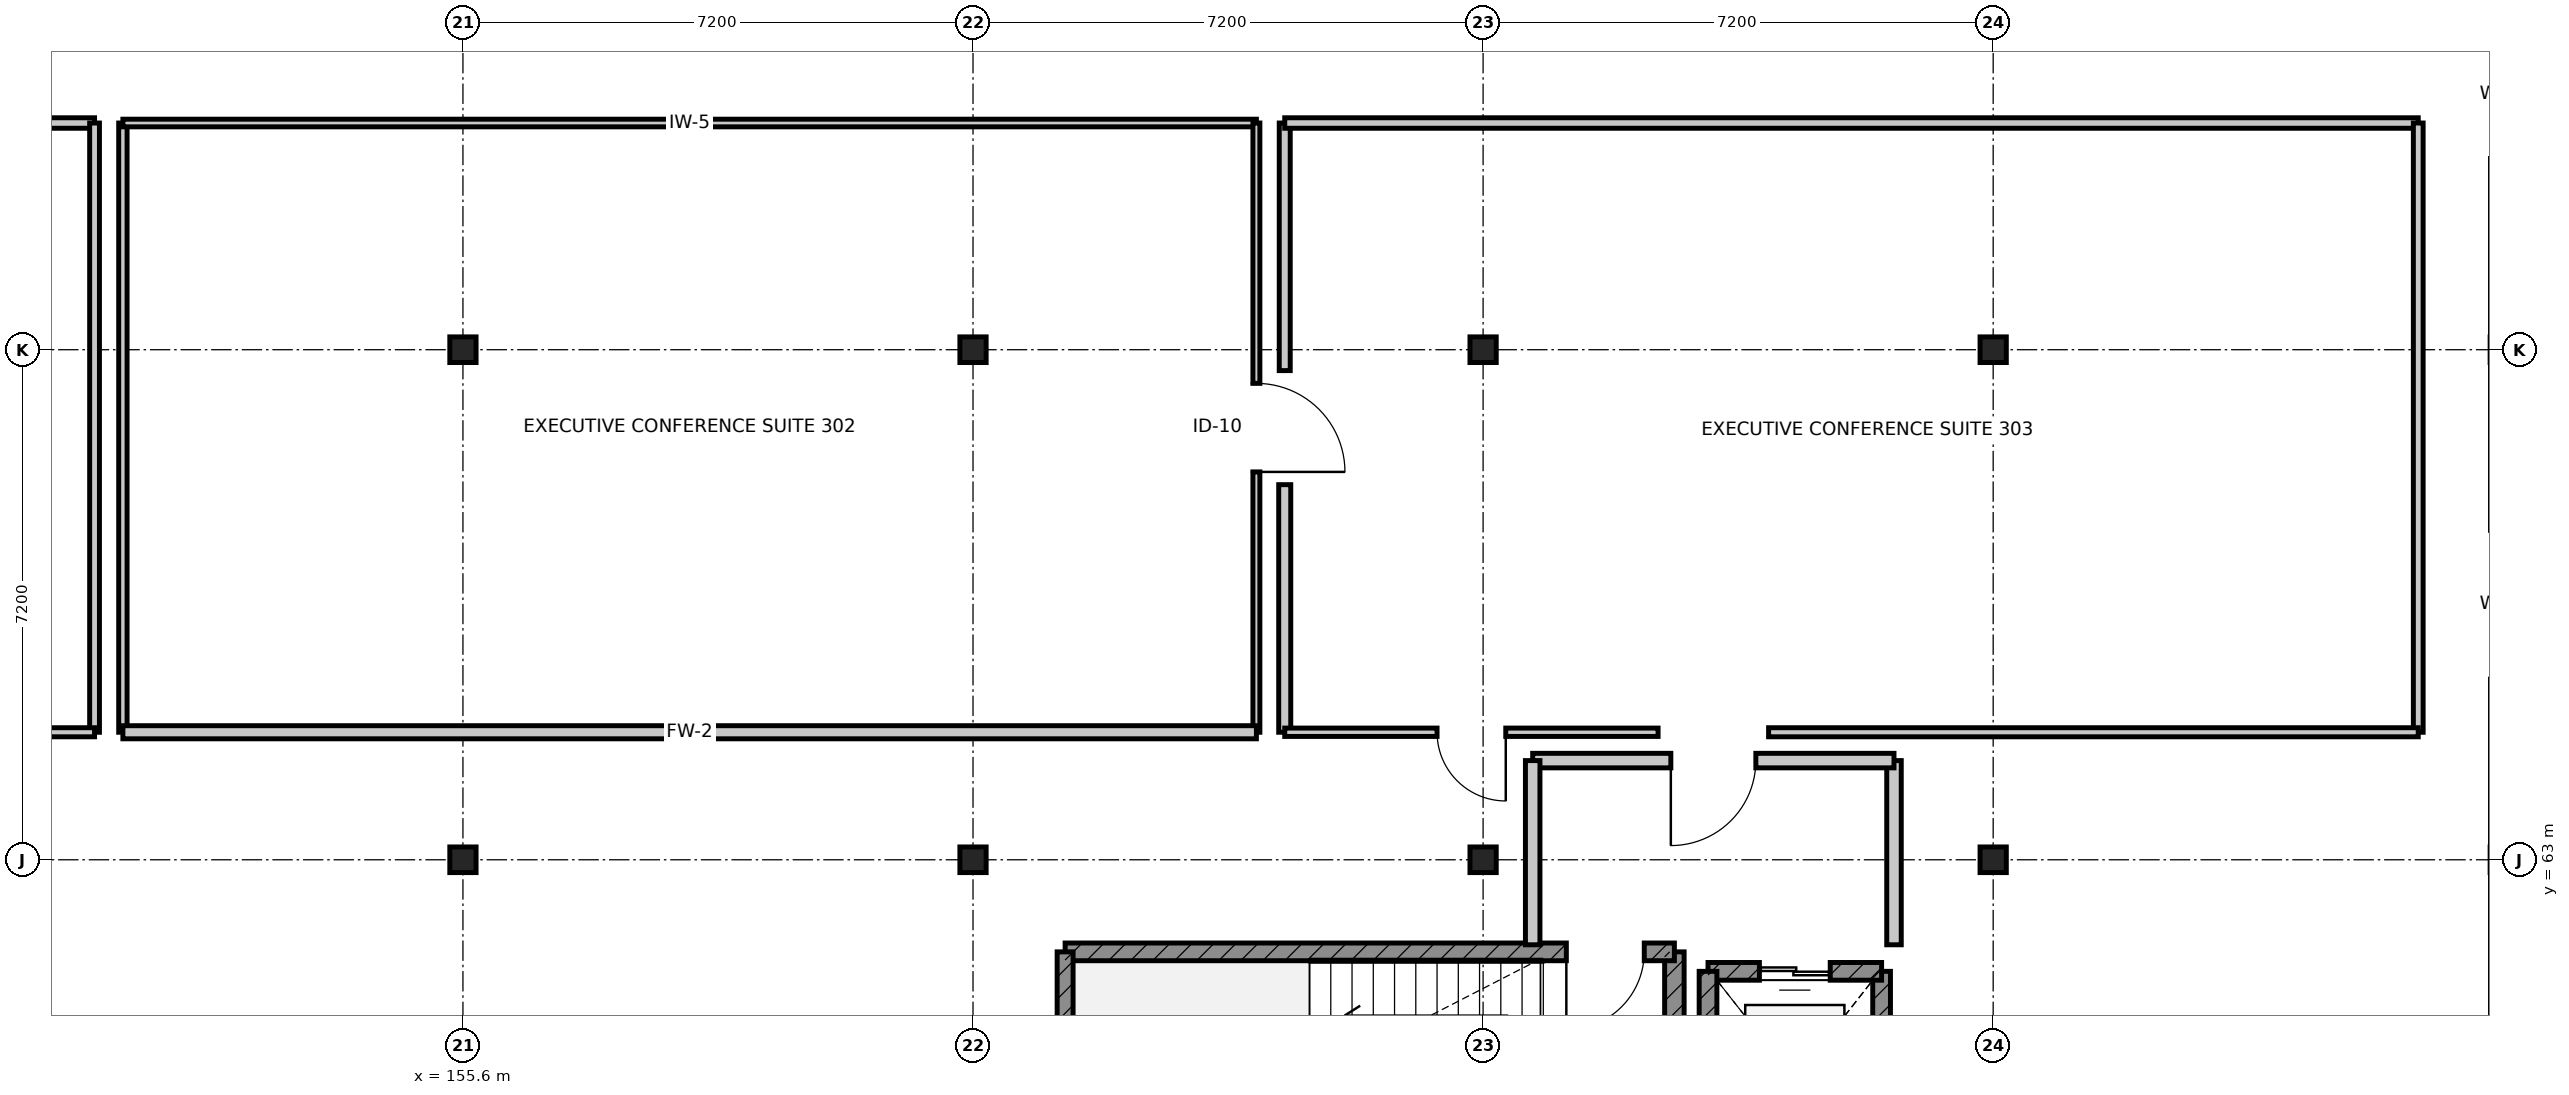
"""IFC4 building model, lengths in metres.
Left out: names, types, materials, properties, quantities, classifications, styles, units other than length and angle.
Written with IfcOpenShell. Run it as: python <this file> out.ifc"""

import sys

from ifc_helpers import new_model, si_unit, direction, frame, frame_2d, origin, origin_2d, place, context, subcontext, project, spatial, rectangle, i_section, extrude, element, fill, save


model = new_model("IFC4")
c1 = context("Model", 3, precision=1e-05, world=origin(), true_north=direction((0.0, 1.0)))
c2 = subcontext(c1, "Body", "Model", "MODEL_VIEW")
j1 = project(units=[si_unit("LENGTHUNIT", "METRE"), si_unit("PLANEANGLEUNIT", "RADIAN")], contexts=[c1])
p1 = place(None, origin())
s1 = spatial("IfcSite", under=j1, at=p1, CompositionType="ELEMENT")
p2 = place(p1, origin())
s2 = spatial("IfcBuilding", under=s1, at=p2, CompositionType="ELEMENT")
p3 = place(p2, frame((0.0, 0.0, 15.0)))
s3 = spatial("IfcBuildingStorey", under=s2, at=p3, CompositionType="ELEMENT", Elevation=15.0)
for number, where, z_axis, x_axis in (
    (1, (155.6, 63.0, 0.0), (0.0, 0.0, 1.0), (1.0, 0.0, 0.0)),
    (2, (155.6, 70.2, 0.0), (0.0, 0.0, 1.0), (1.0, 0.0, 0.0)),
    (3, (162.8, 63.0, 0.0), (0.0, 0.0, 1.0), (1.0, 0.0, 0.0)),
    (4, (162.8, 70.2, 0.0), (0.0, 0.0, 1.0), (1.0, 0.0, 0.0)),
    (5, (170.0, 63.0, 0.0), (0.0, 0.0, 1.0), (1.0, 0.0, 0.0)),
    (6, (170.0, 70.2, 0.0), (0.0, 0.0, 1.0), (1.0, 0.0, 0.0)),
    (7, (177.2, 63.0, 0.0), (0.0, 0.0, 1.0), (1.0, 0.0, 0.0)),
    (8, (177.2, 70.2, 0.0), (0.0, 0.0, 1.0), (1.0, 0.0, 0.0)),
):
    element("IfcColumn", number, at=place(p3, frame(where, z_axis=z_axis, x_axis=x_axis)), inside=s3, PredefinedType="COLUMN", context=c2, shape_type="SweptSolid", body=[
        extrude(i_section(OverallWidth=0.371, OverallDepth=0.362, WebThickness=0.012, FlangeThickness=0.021, FilletRadius=0.015, at=origin_2d()), origin(), (0.0, 0.0, 1.0), 4.2),
    ])
p4 = place(p3, frame((172.7, 58.1, 0.0), z_axis=(0.0, 0.0, 1.0), x_axis=(0.0, 1.0, 0.0)))
e9 = element("IfcWall", 9, at=p4, inside=s3, PredefinedType="SHEAR", context=c2, shape_type="SweptSolid", body=[
    extrude(rectangle(XDim=3.6, YDim=0.275, at=frame_2d((1.8, 0.0))), origin(), (0.0, 0.0, 1.0), 3.94),
])
p5 = place(p3, frame((172.7, 61.7, 0.0), z_axis=(0.0, 0.0, 1.0), x_axis=(-1.0, 0.0, 0.0)))
e10 = element("IfcWall", 10, at=p5, inside=s3, PredefinedType="SHEAR", context=c2, shape_type="SweptSolid", body=[
    extrude(rectangle(XDim=8.6, YDim=0.25, at=frame_2d((4.3, 0.0))), origin(), (0.0, 0.0, 1.0), 3.94),
])
p6 = place(p5, frame((0.425, 0.0, 0.0)))
e11 = element("IfcOpeningElement", 11, at=p6, cuts=e10, PredefinedType="OPENING", context=c2, shape_type="SweptSolid", body=[
    extrude(rectangle(XDim=1.1, YDim=2.1, at=frame_2d((0.55, 1.05))), frame((0.0, 0.135, 0.0), z_axis=(0.0, -1.0, 0.0), x_axis=(1.0, 0.0, 0.0)), (0.0, 0.0, 1.0), 0.27),
])
p7 = place(p3, frame((164.1, 61.7, 0.0), z_axis=(0.0, 0.0, 1.0), x_axis=(0.0, -1.0, 0.0)))
e12 = element("IfcWall", 12, at=p7, inside=s3, PredefinedType="SHEAR", context=c2, shape_type="SweptSolid", body=[
    extrude(rectangle(XDim=3.6, YDim=0.225, at=frame_2d((1.8, 0.0))), origin(), (0.0, 0.0, 1.0), 3.94),
])
p8 = place(p3, frame((175.625, 58.375, 0.0), z_axis=(0.0, 0.0, 1.0), x_axis=(0.0, 1.0, 0.0)))
e13 = element("IfcWall", 13, at=p8, inside=s3, PredefinedType="SHEAR", context=c2, shape_type="SweptSolid", body=[
    extrude(rectangle(XDim=3.05, YDim=0.25, at=frame_2d((1.525, 0.0))), origin(), (0.0, 0.0, 1.0), 3.94),
])
p9 = place(p3, frame((175.625, 61.425, 0.0), z_axis=(0.0, 0.0, 1.0), x_axis=(-1.0, 0.0, 0.0)))
e14 = element("IfcWall", 14, at=p9, inside=s3, PredefinedType="SHEAR", context=c2, shape_type="SweptSolid", body=[
    extrude(rectangle(XDim=2.45, YDim=0.25, at=frame_2d((1.225, 0.0))), origin(), (0.0, 0.0, 1.0), 3.94),
])
p10 = place(p9, frame((0.725, 0.0, 0.0)))
e15 = element("IfcOpeningElement", 15, at=p10, cuts=e14, PredefinedType="OPENING", context=c2, shape_type="SweptSolid", body=[
    extrude(rectangle(XDim=1.0, YDim=2.15, at=frame_2d((0.5, 1.075))), frame((0.0, 0.135, 0.0), z_axis=(0.0, -1.0, 0.0), x_axis=(1.0, 0.0, 0.0)), (0.0, 0.0, 1.0), 0.27),
])
p11 = place(p3, frame((173.175, 61.425, 0.0), z_axis=(0.0, 0.0, 1.0), x_axis=(0.0, -1.0, 0.0)))
e16 = element("IfcWall", 16, at=p11, inside=s3, PredefinedType="SHEAR", context=c2, shape_type="SweptSolid", body=[
    extrude(rectangle(XDim=3.05, YDim=0.25, at=frame_2d((1.525, 0.0))), origin(), (0.0, 0.0, 1.0), 3.94),
])
p12 = place(p3, frame((175.8, 61.8, 0.0), z_axis=(0.0, 0.0, 1.0), x_axis=(0.0, 1.0, 0.0)))
e17 = element("IfcWall", 17, at=p12, inside=s3, PredefinedType="PARTITIONING", context=c2, shape_type="SweptSolid", body=[
    extrude(rectangle(XDim=2.6, YDim=0.205, at=frame_2d((1.3, 0.0))), origin(), (0.0, 0.0, 1.0), 3.516),
])
p13 = place(p3, frame((175.8, 64.4, 0.0), z_axis=(0.0, 0.0, 1.0), x_axis=(-1.0, 0.0, 0.0)))
e18 = element("IfcWall", 18, at=p13, inside=s3, PredefinedType="PARTITIONING", context=c2, shape_type="SweptSolid", body=[
    extrude(rectangle(XDim=5.1, YDim=0.205, at=frame_2d((2.55, 0.0))), origin(), (0.0, 0.0, 1.0), 3.94),
])
p14 = place(p13, frame((1.95, 0.0, 0.0)))
e19 = element("IfcOpeningElement", 19, at=p14, cuts=e18, PredefinedType="OPENING", context=c2, shape_type="SweptSolid", body=[
    extrude(rectangle(XDim=1.2, YDim=2.1, at=frame_2d((0.6, 1.05))), frame((0.0, 0.113, 0.0), z_axis=(0.0, -1.0, 0.0), x_axis=(1.0, 0.0, 0.0)), (0.0, 0.0, 1.0), 0.225),
])
p15 = place(p3, frame((170.7, 64.4, 0.0), z_axis=(0.0, 0.0, 1.0), x_axis=(0.0, -1.0, 0.0)))
e20 = element("IfcWall", 20, at=p15, inside=s3, PredefinedType="PARTITIONING", context=c2, shape_type="SweptSolid", body=[
    extrude(rectangle(XDim=2.6, YDim=0.205, at=frame_2d((1.3, 0.0))), origin(), (0.0, 0.0, 1.0), 3.516),
])
p16 = place(p3, frame((134.4, 73.4, 0.0), z_axis=(0.0, 0.0, 1.0), x_axis=(1.0, 0.0, 0.0)))
e21 = element("IfcWall", 21, at=p16, inside=s3, PredefinedType="PARTITIONING", context=c2, shape_type="SweptSolid", body=[
    extrude(rectangle(XDim=16.0, YDim=0.148, at=frame_2d((8.0, 0.0))), origin(), (0.0, 0.0, 1.0), 3.516),
])
p17 = place(p3, frame((150.4, 73.4, 0.0), z_axis=(0.0, 0.0, 1.0), x_axis=(0.0, -1.0, 0.0)))
e22 = element("IfcWall", 22, at=p17, inside=s3, PredefinedType="PARTITIONING", context=c2, shape_type="SweptSolid", body=[
    extrude(rectangle(XDim=8.6, YDim=0.138, at=frame_2d((4.3, 0.0))), origin(), (0.0, 0.0, 1.0), 3.516),
])
p18 = place(p3, frame((150.4, 64.8, 0.0), z_axis=(0.0, 0.0, 1.0), x_axis=(-1.0, 0.0, 0.0)))
e23 = element("IfcWall", 23, at=p18, inside=s3, PredefinedType="PARTITIONING", context=c2, shape_type="SweptSolid", body=[
    extrude(rectangle(XDim=16.0, YDim=0.128, at=frame_2d((8.0, 0.0))), origin(), (0.0, 0.0, 1.0), 3.516),
])
p19 = place(p3, frame((150.8, 64.8, 0.0), z_axis=(0.0, 0.0, 1.0), x_axis=(0.0, 1.0, 0.0)))
e24 = element("IfcWall", 24, at=p19, inside=s3, PredefinedType="PARTITIONING", context=c2, shape_type="SweptSolid", body=[
    extrude(rectangle(XDim=8.6, YDim=0.118, at=frame_2d((4.3, 0.0))), origin(), (0.0, 0.0, 1.0), 3.516),
])
p20 = place(p3, frame((150.8, 73.4, 0.0), z_axis=(0.0, 0.0, 1.0), x_axis=(1.0, 0.0, 0.0)))
e25 = element("IfcWall", 25, at=p20, inside=s3, PredefinedType="PARTITIONING", context=c2, shape_type="SweptSolid", body=[
    extrude(rectangle(XDim=16.0, YDim=0.108, at=frame_2d((8.0, 0.0))), origin(), (0.0, 0.0, 1.0), 3.516),
])
p21 = place(p3, frame((166.8, 73.4, 0.0), z_axis=(0.0, 0.0, 1.0), x_axis=(0.0, -1.0, 0.0)))
e26 = element("IfcWall", 26, at=p21, inside=s3, PredefinedType="PARTITIONING", context=c2, shape_type="SweptSolid", body=[
    extrude(rectangle(XDim=8.6, YDim=0.098, at=frame_2d((4.3, 0.0))), origin(), (0.0, 0.0, 1.0), 3.516),
])
p22 = place(p21, frame((3.675, 0.0, 0.0)))
e27 = element("IfcOpeningElement", 27, at=p22, cuts=e26, PredefinedType="OPENING", context=c2, shape_type="SweptSolid", body=[
    extrude(rectangle(XDim=1.25, YDim=2.2, at=frame_2d((0.625, 1.1))), frame((0.0, 0.059, 0.0), z_axis=(0.0, -1.0, 0.0), x_axis=(1.0, 0.0, 0.0)), (0.0, 0.0, 1.0), 0.118),
])
p23 = place(p3, frame((166.8, 64.8, 0.0), z_axis=(0.0, 0.0, 1.0), x_axis=(-1.0, 0.0, 0.0)))
e28 = element("IfcWall", 28, at=p23, inside=s3, PredefinedType="PARTITIONING", context=c2, shape_type="SweptSolid", body=[
    extrude(rectangle(XDim=16.0, YDim=0.185, at=frame_2d((8.0, 0.0))), origin(), (0.0, 0.0, 1.0), 3.516),
])
p24 = place(p3, frame((167.2, 64.8, 0.0), z_axis=(0.0, 0.0, 1.0), x_axis=(0.0, 1.0, 0.0)))
e29 = element("IfcWall", 29, at=p24, inside=s3, PredefinedType="PARTITIONING", context=c2, shape_type="SweptSolid", body=[
    extrude(rectangle(XDim=3.495, YDim=0.17, at=frame_2d((1.748, 0.0))), origin(), (0.0, 0.0, 1.0), 3.618),
])
p25 = place(p3, frame((167.2, 69.905, 0.0), z_axis=(0.0, 0.0, 1.0), x_axis=(0.0, 1.0, 0.0)))
e30 = element("IfcWall", 30, at=p25, inside=s3, PredefinedType="PARTITIONING", context=c2, shape_type="SweptSolid", body=[
    extrude(rectangle(XDim=3.495, YDim=0.155, at=frame_2d((1.748, 0.0))), origin(), (0.0, 0.0, 1.0), 3.516),
])
p26 = place(p3, frame((167.2, 73.4, 0.0), z_axis=(0.0, 0.0, 1.0), x_axis=(1.0, 0.0, 0.0)))
e31 = element("IfcWall", 31, at=p26, inside=s3, PredefinedType="PARTITIONING", context=c2, shape_type="SweptSolid", body=[
    extrude(rectangle(XDim=16.0, YDim=0.148, at=frame_2d((8.0, 0.0))), origin(), (0.0, 0.0, 1.0), 3.516),
])
p27 = place(p3, frame((183.2, 73.4, 0.0), z_axis=(0.0, 0.0, 1.0), x_axis=(0.0, -1.0, 0.0)))
e32 = element("IfcWall", 32, at=p27, inside=s3, PredefinedType="PARTITIONING", context=c2, shape_type="SweptSolid", body=[
    extrude(rectangle(XDim=8.6, YDim=0.138, at=frame_2d((4.3, 0.0))), origin(), (0.0, 0.0, 1.0), 3.516),
])
p28 = place(p3, frame((183.2, 64.8, 0.0), z_axis=(0.0, 0.0, 1.0), x_axis=(-1.0, 0.0, 0.0)))
e33 = element("IfcWall", 33, at=p28, inside=s3, PredefinedType="PARTITIONING", context=c2, shape_type="SweptSolid", body=[
    extrude(rectangle(XDim=9.17, YDim=0.128, at=frame_2d((4.585, 0.0))), origin(), (0.0, 0.0, 1.0), 3.516),
])
p29 = place(p3, frame((172.47, 64.8, 0.0), z_axis=(0.0, 0.0, 1.0), x_axis=(-1.0, 0.0, 0.0)))
e34 = element("IfcWall", 34, at=p29, inside=s3, PredefinedType="PARTITIONING", context=c2, shape_type="SweptSolid", body=[
    extrude(rectangle(XDim=5.27, YDim=0.118, at=frame_2d((2.635, 0.0))), origin(), (0.0, 0.0, 1.0), 3.516),
])
p30 = place(p29, frame((2.15, 0.0, 0.0)))
e35 = element("IfcOpeningElement", 35, at=p30, cuts=e34, PredefinedType="OPENING", context=c2, shape_type="SweptSolid", body=[
    extrude(rectangle(XDim=0.97, YDim=2.16, at=frame_2d((0.485, 1.08))), frame((0.0, 0.069, 0.0), z_axis=(0.0, -1.0, 0.0), x_axis=(1.0, 0.0, 0.0)), (0.0, 0.0, 1.0), 0.138),
])
p31 = place(p6, origin())
e36 = element("IfcDoor", 36, at=p31, inside=s3, OperationType="SINGLE_SWING_RIGHT", PredefinedType="DOOR", context=c2, shape_type="SweptSolid", body=[
    extrude(rectangle(XDim=1.1, YDim=2.1, at=frame_2d((0.55, 1.05))), frame((0.0, 0.025, 0.0), z_axis=(0.0, -1.0, 0.0), x_axis=(1.0, 0.0, 0.0)), (0.0, 0.0, 1.0), 0.05),
])
fill(e11, e36)
p32 = place(p10, origin())
e37 = element("IfcDoor", 37, at=p32, inside=s3, OperationType="DOUBLE_DOOR_SLIDING", PredefinedType="DOOR", context=c2, shape_type="SweptSolid", body=[
    extrude(rectangle(XDim=1.0, YDim=2.15, at=frame_2d((0.5, 1.075))), frame((0.0, 0.025, 0.0), z_axis=(0.0, -1.0, 0.0), x_axis=(1.0, 0.0, 0.0)), (0.0, 0.0, 1.0), 0.05),
])
fill(e15, e37)
p33 = place(p14, origin())
e38 = element("IfcDoor", 38, at=p33, inside=s3, OperationType="SINGLE_SWING_RIGHT", PredefinedType="DOOR", context=c2, shape_type="SweptSolid", body=[
    extrude(rectangle(XDim=1.2, YDim=2.1, at=frame_2d((0.6, 1.05))), frame((0.0, 0.025, 0.0), z_axis=(0.0, -1.0, 0.0), x_axis=(1.0, 0.0, 0.0)), (0.0, 0.0, 1.0), 0.05),
])
fill(e19, e38)
p34 = place(p22, origin())
e39 = element("IfcDoor", 39, at=p34, inside=s3, OperationType="SINGLE_SWING_RIGHT", PredefinedType="DOOR", context=c2, shape_type="SweptSolid", body=[
    extrude(rectangle(XDim=1.25, YDim=2.2, at=frame_2d((0.625, 1.1))), frame((0.0, 0.025, 0.0), z_axis=(0.0, -1.0, 0.0), x_axis=(1.0, 0.0, 0.0)), (0.0, 0.0, 1.0), 0.05),
])
fill(e27, e39)
p35 = place(p30, origin())
e40 = element("IfcDoor", 40, at=p35, inside=s3, OperationType="SINGLE_SWING_LEFT", PredefinedType="DOOR", context=c2, shape_type="SweptSolid", body=[
    extrude(rectangle(XDim=0.97, YDim=2.16, at=frame_2d((0.485, 1.08))), frame((0.0, 0.025, 0.0), z_axis=(0.0, -1.0, 0.0), x_axis=(1.0, 0.0, 0.0)), (0.0, 0.0, 1.0), 0.05),
])
fill(e35, e40)
save(model, sys.argv[1])
